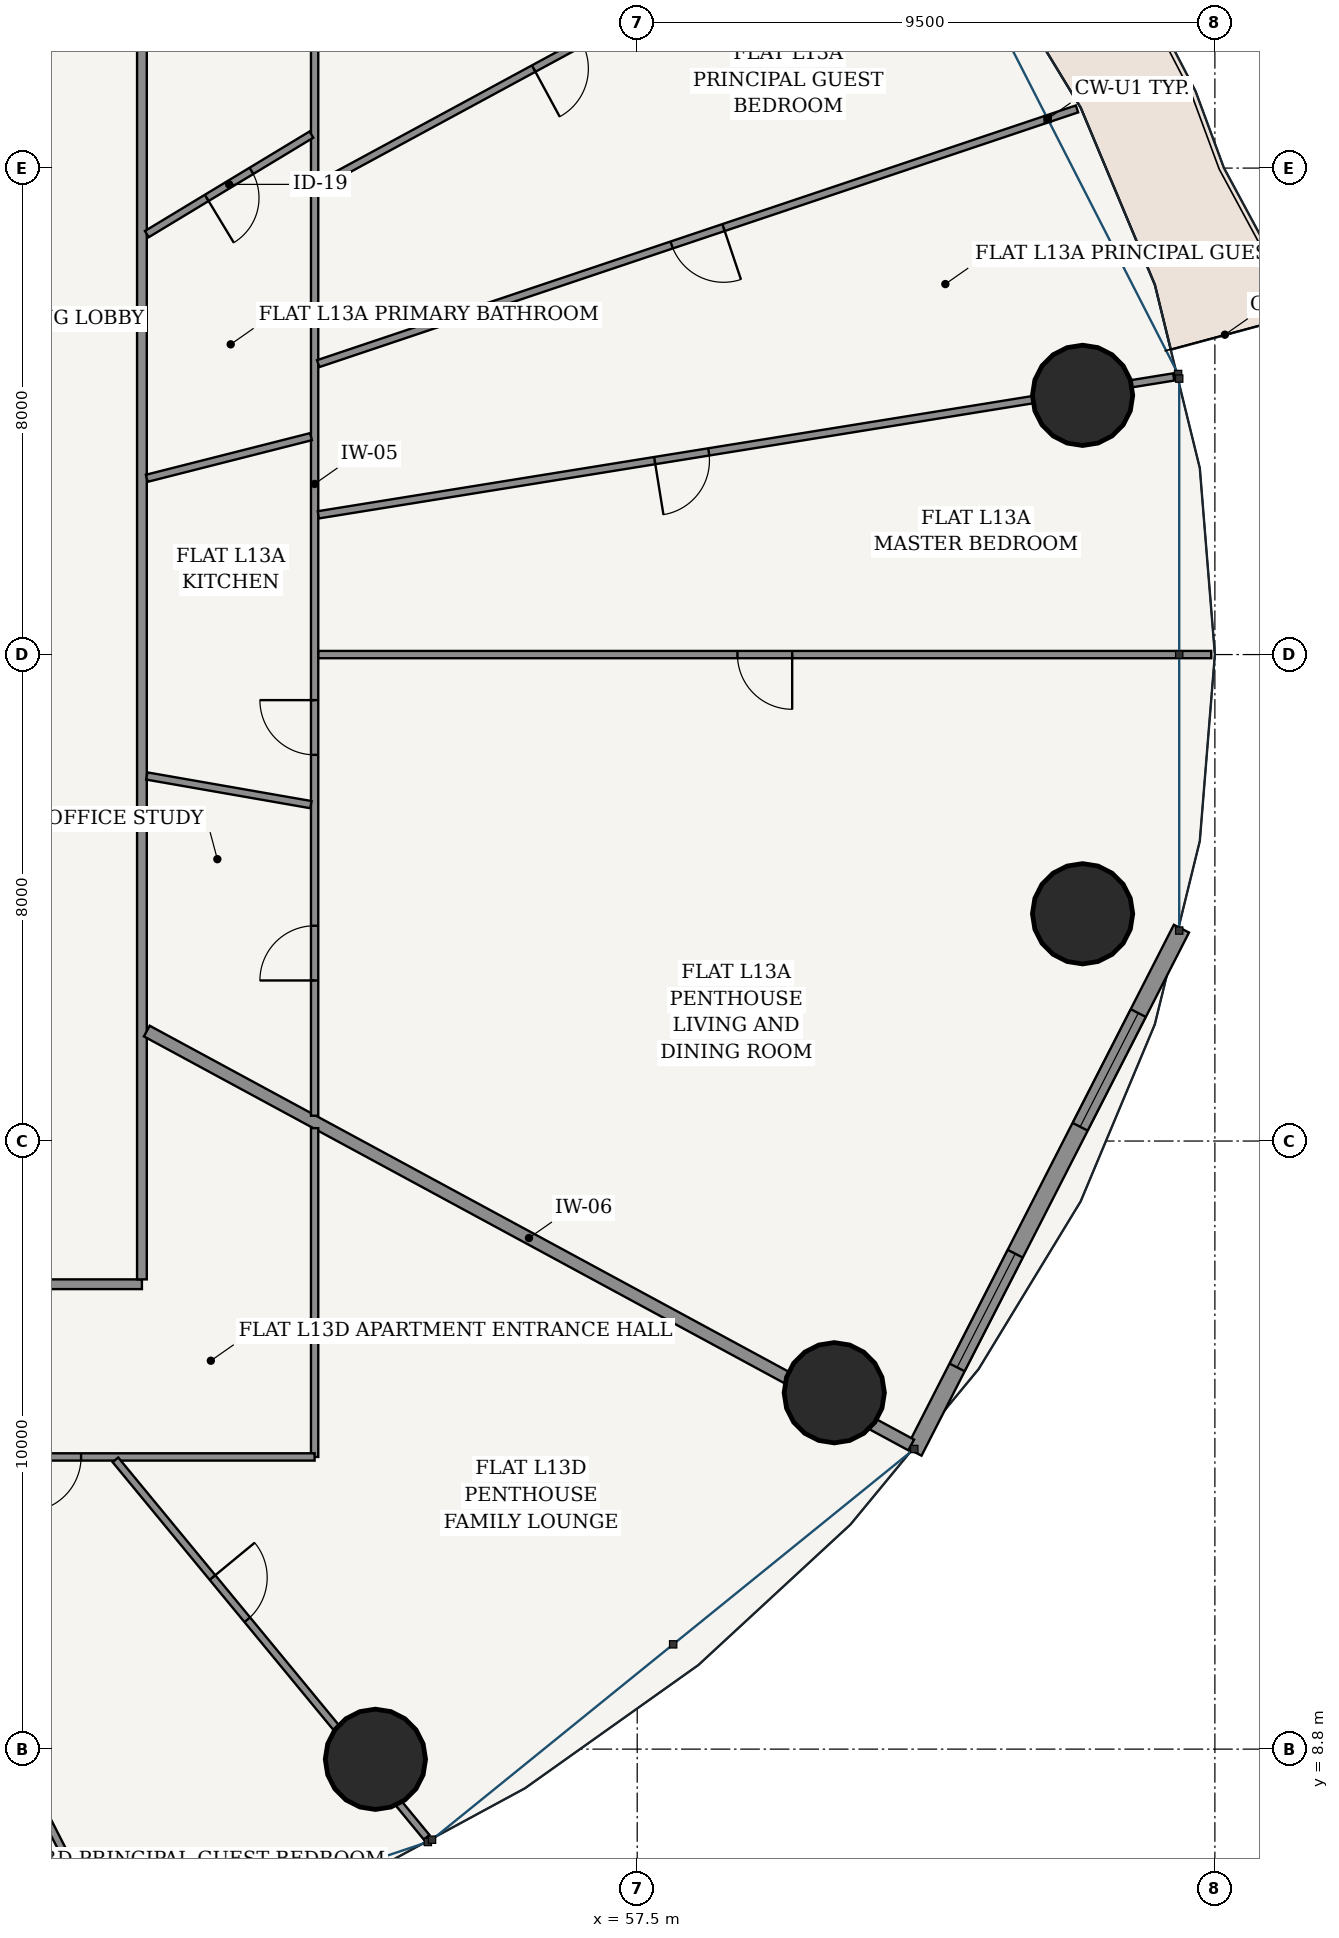
"""IFC4 building model, lengths in metres.
Left out: names, types, materials, properties, quantities, classifications, styles, units other than length and angle.
Written with IfcOpenShell. Run it as: python <this file> out.ifc"""

import sys

from ifc_helpers import new_model, si_unit, direction, frame, frame_2d, origin, origin_2d, place, context, subcontext, project, spatial, rectangle, hollow_circle, extrude, source, transform, mapped, element, fill, save


model = new_model("IFC4")
c1 = context("Model", 3, precision=1e-05, world=origin(), true_north=direction((-0.2419218956, 0.970295726276)))
c2 = subcontext(c1, "Body", "Model", "MODEL_VIEW")
j1 = project(units=[si_unit("LENGTHUNIT", "METRE"), si_unit("PLANEANGLEUNIT", "RADIAN")], contexts=[c1])
p1 = place(None, origin())
s1 = spatial("IfcSite", under=j1, at=p1, CompositionType="ELEMENT")
p2 = place(p1, origin())
s2 = spatial("IfcBuilding", under=s1, at=p2, CompositionType="ELEMENT")
p3 = place(p2, frame((0.0, 0.0, 52.8)))
s3 = spatial("IfcBuildingStorey", under=s2, at=p3, CompositionType="ELEMENT", Elevation=52.8)
for number, where, z_axis, x_axis in (
    (1, (64.824, 31.063, 0.0), (0.0, 0.0, 1.0), (1.0, 0.0, 0.0)),
    (2, (53.195, 8.632, 0.0), (0.0, 0.0, 1.0), (1.0, 0.0, 0.0)),
    (3, (60.741, 14.661, 0.0), (0.0, 0.0, 1.0), (1.0, 0.0, 0.0)),
    (4, (64.824, 22.537, 0.0), (0.0, 0.0, 1.0), (1.0, 0.0, 0.0)),
):
    element("IfcColumn", number, at=place(p3, frame(where, z_axis=z_axis, x_axis=x_axis)), inside=s3, PredefinedType="COLUMN", context=c2, shape_type="SweptSolid", body=[
        extrude(hollow_circle(Radius=0.825, WallThickness=0.05, at=origin_2d()), origin(), (0.0, 0.0, 1.0), 3.6),
    ])
p4 = place(p3, frame((62.051, 13.689, 0.0), z_axis=(0.0, 0.0, 1.0), x_axis=(0.455220575541, 0.890378698984, 0.0)))
e5 = element("IfcWall", 5, at=p4, inside=s3, PredefinedType="SOLIDWALL", context=c2, shape_type="SweptSolid", body=[
    extrude(rectangle(XDim=9.662, YDim=0.28, at=frame_2d((4.831, 0.0))), origin(), (0.0, 0.0, 1.0), 3.32),
])
p5 = place(p4, frame((1.559, 0.0, 0.85)))
e6 = element("IfcOpeningElement", 6, at=p5, cuts=e5, PredefinedType="OPENING", context=c2, shape_type="SweptSolid", body=[
    extrude(rectangle(XDim=2.1, YDim=1.95, at=frame_2d((1.05, 0.975))), frame((0.0, 0.15, 0.0), z_axis=(0.0, -1.0, 0.0), x_axis=(1.0, 0.0, 0.0)), (0.0, 0.0, 1.0), 0.3),
])
p6 = place(p4, frame((6.003, 0.0, 0.85)))
e7 = element("IfcOpeningElement", 7, at=p6, cuts=e5, PredefinedType="OPENING", context=c2, shape_type="SweptSolid", body=[
    extrude(rectangle(XDim=2.1, YDim=1.95, at=frame_2d((1.05, 0.975))), frame((0.0, 0.15, 0.0), z_axis=(0.0, -1.0, 0.0), x_axis=(1.0, 0.0, 0.0)), (0.0, 0.0, 1.0), 0.3),
])
p7 = place(p3, frame((26.645, 16.445, 0.0), z_axis=(0.0, 0.0, 1.0), x_axis=(1.0, 0.0, 0.0)))
e8 = element("IfcWall", 8, at=p7, inside=s3, PredefinedType="PARTITIONING", context=c2, shape_type="SweptSolid", body=[
    extrude(rectangle(XDim=22.71, YDim=0.16, at=frame_2d((11.355, 0.0))), origin(), (0.0, 0.0, 1.0), 2.688),
])
p8 = place(p7, frame((19.962, 0.0, 0.0)))
e9 = element("IfcOpeningElement", 9, at=p8, cuts=e8, PredefinedType="OPENING", context=c2, shape_type="SweptSolid", body=[
    extrude(rectangle(XDim=0.98, YDim=2.2, at=frame_2d((0.49, 1.1))), frame((0.0, 0.09, 0.0), z_axis=(0.0, -1.0, 0.0), x_axis=(1.0, 0.0, 0.0)), (0.0, 0.0, 1.0), 0.18),
])
p9 = place(p3, frame((49.355, 16.525, 0.0), z_axis=(0.0, 0.0, 1.0), x_axis=(0.0, 1.0, 0.0)))
e10 = element("IfcWall", 10, at=p9, inside=s3, PredefinedType="PARTITIONING", context=c2, shape_type="SweptSolid", body=[
    extrude(rectangle(XDim=20.55, YDim=0.16, at=frame_2d((10.275, 0.0))), origin(), (0.0, 0.0, 1.0), 2.688),
])
p10 = place(p3, frame((49.435, 20.608, 0.0), z_axis=(0.0, 0.0, 1.0), x_axis=(0.879369737803, -0.476139542819, 0.0)))
e11 = element("IfcWall", 11, at=p10, inside=s3, PredefinedType="PARTITIONING", context=c2, shape_type="SweptSolid", body=[
    extrude(rectangle(XDim=14.295, YDim=0.2, at=frame_2d((7.147, 0.0))), origin(), (0.0, 0.0, 1.0), 2.688),
])
p11 = place(p3, frame((52.195, 39.995, 0.0), z_axis=(0.0, 0.0, 1.0), x_axis=(0.0, -1.0, 0.0)))
e12 = element("IfcWall", 12, at=p11, inside=s3, PredefinedType="PARTITIONING", context=c2, shape_type="SweptSolid", body=[
    extrude(rectangle(XDim=20.779, YDim=0.12, at=frame_2d((10.39, 0.0))), origin(), (0.0, 0.0, 1.0), 2.688),
])
p12 = place(p11, frame((13.944, 0.0, 0.0)))
e13 = element("IfcOpeningElement", 13, at=p12, cuts=e12, PredefinedType="OPENING", context=c2, shape_type="SweptSolid", body=[
    extrude(rectangle(XDim=0.9, YDim=2.15, at=frame_2d((0.45, 1.075))), frame((0.0, 0.07, 0.0), z_axis=(0.0, -1.0, 0.0), x_axis=(1.0, 0.0, 0.0)), (0.0, 0.0, 1.0), 0.14),
])
p13 = place(p11, frame((17.655, 0.0, 0.0)))
e14 = element("IfcOpeningElement", 14, at=p13, cuts=e12, PredefinedType="OPENING", context=c2, shape_type="SweptSolid", body=[
    extrude(rectangle(XDim=0.9, YDim=2.15, at=frame_2d((0.45, 1.075))), frame((0.0, 0.07, 0.0), z_axis=(0.0, -1.0, 0.0), x_axis=(1.0, 0.0, 0.0)), (0.0, 0.0, 1.0), 0.14),
])
p14 = place(p3, frame((52.257, 26.8, 0.0), z_axis=(0.0, 0.0, 1.0), x_axis=(1.0, 0.0, 0.0)))
e15 = element("IfcWall", 15, at=p14, inside=s3, PredefinedType="PARTITIONING", context=c2, shape_type="SweptSolid", body=[
    extrude(rectangle(XDim=14.683, YDim=0.12, at=frame_2d((7.341, 0.0))), origin(), (0.0, 0.0, 1.0), 2.762),
])
p15 = place(p14, frame((6.892, 0.0, 0.0)))
e16 = element("IfcOpeningElement", 16, at=p15, cuts=e15, PredefinedType="OPENING", context=c2, shape_type="SweptSolid", body=[
    extrude(rectangle(XDim=0.9, YDim=2.15, at=frame_2d((0.45, 1.075))), frame((0.0, 0.07, 0.0), z_axis=(0.0, -1.0, 0.0), x_axis=(1.0, 0.0, 0.0)), (0.0, 0.0, 1.0), 0.14),
])
p16 = place(p3, frame((52.256, 29.098, 0.0), z_axis=(0.0, 0.0, 1.0), x_axis=(0.987257017041, 0.159133850272, 0.0)))
e17 = element("IfcWall", 17, at=p16, inside=s3, PredefinedType="PARTITIONING", context=c2, shape_type="SweptSolid", body=[
    extrude(rectangle(XDim=14.248, YDim=0.12, at=frame_2d((7.124, 0.0))), origin(), (0.0, 0.0, 1.0), 2.688),
])
p17 = place(p16, frame((5.603, 0.0, 0.0)))
e18 = element("IfcOpeningElement", 18, at=p17, cuts=e17, PredefinedType="OPENING", context=c2, shape_type="SweptSolid", body=[
    extrude(rectangle(XDim=0.9, YDim=2.15, at=frame_2d((0.45, 1.075))), frame((0.0, 0.07, 0.0), z_axis=(0.0, -1.0, 0.0), x_axis=(1.0, 0.0, 0.0)), (0.0, 0.0, 1.0), 0.14),
])
p18 = place(p3, frame((52.254, 31.584, 0.0), z_axis=(0.0, 0.0, 1.0), x_axis=(0.948022802246, 0.318202398516, 0.0)))
e19 = element("IfcWall", 19, at=p18, inside=s3, PredefinedType="PARTITIONING", context=c2, shape_type="SweptSolid", body=[
    extrude(rectangle(XDim=13.163, YDim=0.12, at=frame_2d((6.582, 0.0))), origin(), (0.0, 0.0, 1.0), 2.762),
])
p19 = place(p18, frame((6.131, 0.0, 0.0)))
e20 = element("IfcOpeningElement", 20, at=p19, cuts=e19, PredefinedType="OPENING", context=c2, shape_type="SweptSolid", body=[
    extrude(rectangle(XDim=0.9, YDim=2.15, at=frame_2d((0.45, 1.075))), frame((0.0, 0.07, 0.0), z_axis=(0.0, -1.0, 0.0), x_axis=(1.0, 0.0, 0.0)), (0.0, 0.0, 1.0), 0.14),
])
p20 = place(p3, frame((52.25, 34.515, 0.0), z_axis=(0.0, 0.0, 1.0), x_axis=(0.879370672984, 0.476137815654, 0.0)))
e21 = element("IfcWall", 21, at=p20, inside=s3, PredefinedType="PARTITIONING", context=c2, shape_type="SweptSolid", body=[
    extrude(rectangle(XDim=11.094, YDim=0.12, at=frame_2d((5.547, 0.0))), origin(), (0.0, 0.0, 1.0), 2.688),
])
p21 = place(p20, frame((4.034, 0.0, 0.0)))
e22 = element("IfcOpeningElement", 22, at=p21, cuts=e21, PredefinedType="OPENING", context=c2, shape_type="SweptSolid", body=[
    extrude(rectangle(XDim=0.9, YDim=2.15, at=frame_2d((0.45, 1.075))), frame((0.0, 0.07, 0.0), z_axis=(0.0, -1.0, 0.0), x_axis=(1.0, 0.0, 0.0)), (0.0, 0.0, 1.0), 0.14),
])
p22 = place(p3, frame((49.435, 24.803, 0.0), z_axis=(0.0, 0.0, 1.0), x_axis=(0.985100365489, -0.171980434681, 0.0)))
e23 = element("IfcWall", 23, at=p22, inside=s3, PredefinedType="PARTITIONING", context=c2, shape_type="SweptSolid", body=[
    extrude(rectangle(XDim=2.74, YDim=0.12, at=frame_2d((1.37, 0.0))), origin(), (0.0, 0.0, 1.0), 3.32),
])
p23 = place(p3, frame((49.435, 29.699, 0.0), z_axis=(0.0, 0.0, 1.0), x_axis=(0.969327617988, 0.245772189243, 0.0)))
e24 = element("IfcWall", 24, at=p23, inside=s3, PredefinedType="PARTITIONING", context=c2, shape_type="SweptSolid", body=[
    extrude(rectangle(XDim=2.785, YDim=0.12, at=frame_2d((1.393, 0.0))), origin(), (0.0, 0.0, 1.0), 3.32),
])
p24 = place(p3, frame((49.435, 33.714, 0.0), z_axis=(0.0, 0.0, 1.0), x_axis=(0.855724035959, 0.517432482824, 0.0)))
e25 = element("IfcWall", 25, at=p24, inside=s3, PredefinedType="PARTITIONING", context=c2, shape_type="SweptSolid", body=[
    extrude(rectangle(XDim=3.163, YDim=0.12, at=frame_2d((1.582, 0.0))), origin(), (0.0, 0.0, 1.0), 3.32),
])
p25 = place(p24, frame((1.152, 0.0, 0.0)))
e26 = element("IfcOpeningElement", 26, at=p25, cuts=e25, PredefinedType="OPENING", context=c2, shape_type="SweptSolid", body=[
    extrude(rectangle(XDim=0.86, YDim=2.15, at=frame_2d((0.43, 1.075))), frame((0.0, 0.07, 0.0), z_axis=(0.0, -1.0, 0.0), x_axis=(1.0, 0.0, 0.0)), (0.0, 0.0, 1.0), 0.14),
])
p26 = place(p3, frame((52.195, 19.012, 0.0), z_axis=(0.0, 0.0, 1.0), x_axis=(0.0, -1.0, 0.0)))
e27 = element("IfcWall", 27, at=p26, inside=s3, PredefinedType="PARTITIONING", context=c2, shape_type="SweptSolid", body=[
    extrude(rectangle(XDim=5.407, YDim=0.12, at=frame_2d((2.704, 0.0))), origin(), (0.0, 0.0, 1.0), 2.999),
])
p27 = place(p3, frame((52.195, 13.605, 0.0), z_axis=(0.0, 0.0, 1.0), x_axis=(-1.0, 0.0, 0.0)))
e28 = element("IfcWall", 28, at=p27, inside=s3, PredefinedType="PARTITIONING", context=c2, shape_type="SweptSolid", body=[
    extrude(rectangle(XDim=24.973, YDim=0.12, at=frame_2d((12.487, 0.0))), origin(), (0.0, 0.0, 1.0), 2.688),
])
p28 = place(p27, frame((3.841, 0.0, 0.0)))
e29 = element("IfcOpeningElement", 29, at=p28, cuts=e28, PredefinedType="OPENING", context=c2, shape_type="SweptSolid", body=[
    extrude(rectangle(XDim=0.9, YDim=2.15, at=frame_2d((0.45, 1.075))), frame((0.0, 0.07, 0.0), z_axis=(0.0, -1.0, 0.0), x_axis=(1.0, 0.0, 0.0)), (0.0, 0.0, 1.0), 0.14),
])
p29 = place(p27, frame((15.819, 0.0, 0.0)))
e30 = element("IfcOpeningElement", 30, at=p29, cuts=e28, PredefinedType="OPENING", context=c2, shape_type="SweptSolid", body=[
    extrude(rectangle(XDim=0.9, YDim=2.15, at=frame_2d((0.45, 1.075))), frame((0.0, 0.07, 0.0), z_axis=(0.0, -1.0, 0.0), x_axis=(1.0, 0.0, 0.0)), (0.0, 0.0, 1.0), 0.14),
])
p30 = place(p27, frame((21.123, 0.0, 0.0)))
e31 = element("IfcOpeningElement", 31, at=p30, cuts=e28, PredefinedType="OPENING", context=c2, shape_type="SweptSolid", body=[
    extrude(rectangle(XDim=0.9, YDim=2.15, at=frame_2d((0.45, 1.075))), frame((0.0, 0.07, 0.0), z_axis=(0.0, -1.0, 0.0), x_axis=(1.0, 0.0, 0.0)), (0.0, 0.0, 1.0), 0.14),
])
p31 = place(p3, frame((44.773, 13.55, 0.0), z_axis=(0.0, 0.0, 1.0), x_axis=(0.455131567849, -0.890424200001, 0.0)))
e32 = element("IfcWall", 32, at=p31, inside=s3, PredefinedType="PARTITIONING", context=c2, shape_type="SweptSolid", body=[
    extrude(rectangle(XDim=9.439, YDim=0.12, at=frame_2d((4.719, 0.0))), origin(), (0.0, 0.0, 1.0), 2.762),
])
p32 = place(p31, frame((4.269, 0.0, 0.0)))
e33 = element("IfcOpeningElement", 33, at=p32, cuts=e32, PredefinedType="OPENING", context=c2, shape_type="SweptSolid", body=[
    extrude(rectangle(XDim=0.9, YDim=2.15, at=frame_2d((0.45, 1.075))), frame((0.0, 0.07, 0.0), z_axis=(0.0, -1.0, 0.0), x_axis=(1.0, 0.0, 0.0)), (0.0, 0.0, 1.0), 0.14),
])
p33 = place(p3, frame((48.919, 13.557, 0.0), z_axis=(0.0, 0.0, 1.0), x_axis=(0.636193310573, -0.771529695852, 0.0)))
e34 = element("IfcWall", 34, at=p33, inside=s3, PredefinedType="PARTITIONING", context=c2, shape_type="SweptSolid", body=[
    extrude(rectangle(XDim=8.044, YDim=0.12, at=frame_2d((4.022, 0.0))), origin(), (0.0, 0.0, 1.0), 2.688),
])
p34 = place(p33, frame((2.508, 0.0, 0.0)))
e35 = element("IfcOpeningElement", 35, at=p34, cuts=e34, PredefinedType="OPENING", context=c2, shape_type="SweptSolid", body=[
    extrude(rectangle(XDim=0.9, YDim=2.15, at=frame_2d((0.45, 1.075))), frame((0.0, 0.07, 0.0), z_axis=(0.0, -1.0, 0.0), x_axis=(1.0, 0.0, 0.0)), (0.0, 0.0, 1.0), 0.14),
])
m1 = source(origin(), c2, "Body", "SweptSolid", [
    extrude(rectangle(XDim=2.1, YDim=1.95, at=frame_2d((1.05, 0.975))), frame((0.0, 0.03, 0.0), z_axis=(0.0, -1.0, 0.0), x_axis=(1.0, 0.0, 0.0)), (0.0, 0.0, 1.0), 0.06),
])
p35 = place(p5, origin())
e36 = element("IfcWindow", 36, at=p35, inside=s3, PartitioningType="SINGLE_PANEL", PredefinedType="WINDOW", context=c2, shape_type="MappedRepresentation", body=[
    mapped(m1, transform((0.0, 0.0, 0.0), scale=1.0)),
])
fill(e6, e36)
p36 = place(p6, origin())
e37 = element("IfcWindow", 37, at=p36, inside=s3, PartitioningType="SINGLE_PANEL", PredefinedType="WINDOW", context=c2, shape_type="MappedRepresentation", body=[
    mapped(m1, transform((0.0, 0.0, 0.0), scale=1.0)),
])
fill(e7, e37)
m2 = source(origin(), c2, "Body", "SweptSolid", [
    extrude(rectangle(XDim=0.86, YDim=2.15, at=frame_2d((0.43, 1.075))), frame((0.0, 0.025, 0.0), z_axis=(0.0, -1.0, 0.0), x_axis=(1.0, 0.0, 0.0)), (0.0, 0.0, 1.0), 0.05),
])
p37 = place(p25, frame((0.86, 0.0, 0.0), z_axis=(0.0, 0.0, 1.0), x_axis=(-1.0, 0.0, 0.0)))
e38 = element("IfcDoor", 38, at=p37, inside=s3, OperationType="SINGLE_SWING_RIGHT", PredefinedType="DOOR", context=c2, shape_type="MappedRepresentation", body=[
    mapped(m2, transform((0.0, 0.0, 0.0), scale=1.0)),
])
fill(e26, e38)
m3 = source(origin(), c2, "Body", "SweptSolid", [
    extrude(rectangle(XDim=0.9, YDim=2.15, at=frame_2d((0.45, 1.075))), frame((0.0, 0.025, 0.0), z_axis=(0.0, -1.0, 0.0), x_axis=(1.0, 0.0, 0.0)), (0.0, 0.0, 1.0), 0.05),
])
p38 = place(p21, frame((0.9, 0.0, 0.0), z_axis=(0.0, 0.0, 1.0), x_axis=(-1.0, 0.0, 0.0)))
e39 = element("IfcDoor", 39, at=p38, inside=s3, OperationType="SINGLE_SWING_RIGHT", PredefinedType="DOOR", context=c2, shape_type="MappedRepresentation", body=[
    mapped(m3, transform((0.0, 0.0, 0.0), scale=1.0)),
])
fill(e22, e39)
p39 = place(p19, frame((0.9, 0.0, 0.0), z_axis=(0.0, 0.0, 1.0), x_axis=(-1.0, 0.0, 0.0)))
e40 = element("IfcDoor", 40, at=p39, inside=s3, OperationType="SINGLE_SWING_LEFT", PredefinedType="DOOR", context=c2, shape_type="MappedRepresentation", body=[
    mapped(m3, transform((0.0, 0.0, 0.0), scale=1.0)),
])
fill(e20, e40)
p40 = place(p17, frame((0.9, 0.0, 0.0), z_axis=(0.0, 0.0, 1.0), x_axis=(-1.0, 0.0, 0.0)))
e41 = element("IfcDoor", 41, at=p40, inside=s3, OperationType="SINGLE_SWING_RIGHT", PredefinedType="DOOR", context=c2, shape_type="MappedRepresentation", body=[
    mapped(m3, transform((0.0, 0.0, 0.0), scale=1.0)),
])
fill(e18, e41)
p41 = place(p15, frame((0.9, 0.0, 0.0), z_axis=(0.0, 0.0, 1.0), x_axis=(-1.0, 0.0, 0.0)))
e42 = element("IfcDoor", 42, at=p41, inside=s3, OperationType="SINGLE_SWING_LEFT", PredefinedType="DOOR", context=c2, shape_type="MappedRepresentation", body=[
    mapped(m3, transform((0.0, 0.0, 0.0), scale=1.0)),
])
fill(e16, e42)
p42 = place(p12, frame((0.9, 0.0, 0.0), z_axis=(0.0, 0.0, 1.0), x_axis=(-1.0, 0.0, 0.0)))
e43 = element("IfcDoor", 43, at=p42, inside=s3, OperationType="SINGLE_SWING_RIGHT", PredefinedType="DOOR", context=c2, shape_type="MappedRepresentation", body=[
    mapped(m3, transform((0.0, 0.0, 0.0), scale=1.0)),
])
fill(e13, e43)
p43 = place(p13, frame((0.9, 0.0, 0.0), z_axis=(0.0, 0.0, 1.0), x_axis=(-1.0, 0.0, 0.0)))
e44 = element("IfcDoor", 44, at=p43, inside=s3, OperationType="SINGLE_SWING_LEFT", PredefinedType="DOOR", context=c2, shape_type="MappedRepresentation", body=[
    mapped(m3, transform((0.0, 0.0, 0.0), scale=1.0)),
])
fill(e14, e44)
p44 = place(p28, origin())
e45 = element("IfcDoor", 45, at=p44, inside=s3, OperationType="SINGLE_SWING_RIGHT", PredefinedType="DOOR", context=c2, shape_type="MappedRepresentation", body=[
    mapped(m3, transform((0.0, 0.0, 0.0), scale=1.0)),
])
fill(e29, e45)
p45 = place(p34, origin())
e46 = element("IfcDoor", 46, at=p45, inside=s3, OperationType="SINGLE_SWING_LEFT", PredefinedType="DOOR", context=c2, shape_type="MappedRepresentation", body=[
    mapped(m3, transform((0.0, 0.0, 0.0), scale=1.0)),
])
fill(e35, e46)
save(model, sys.argv[1])
